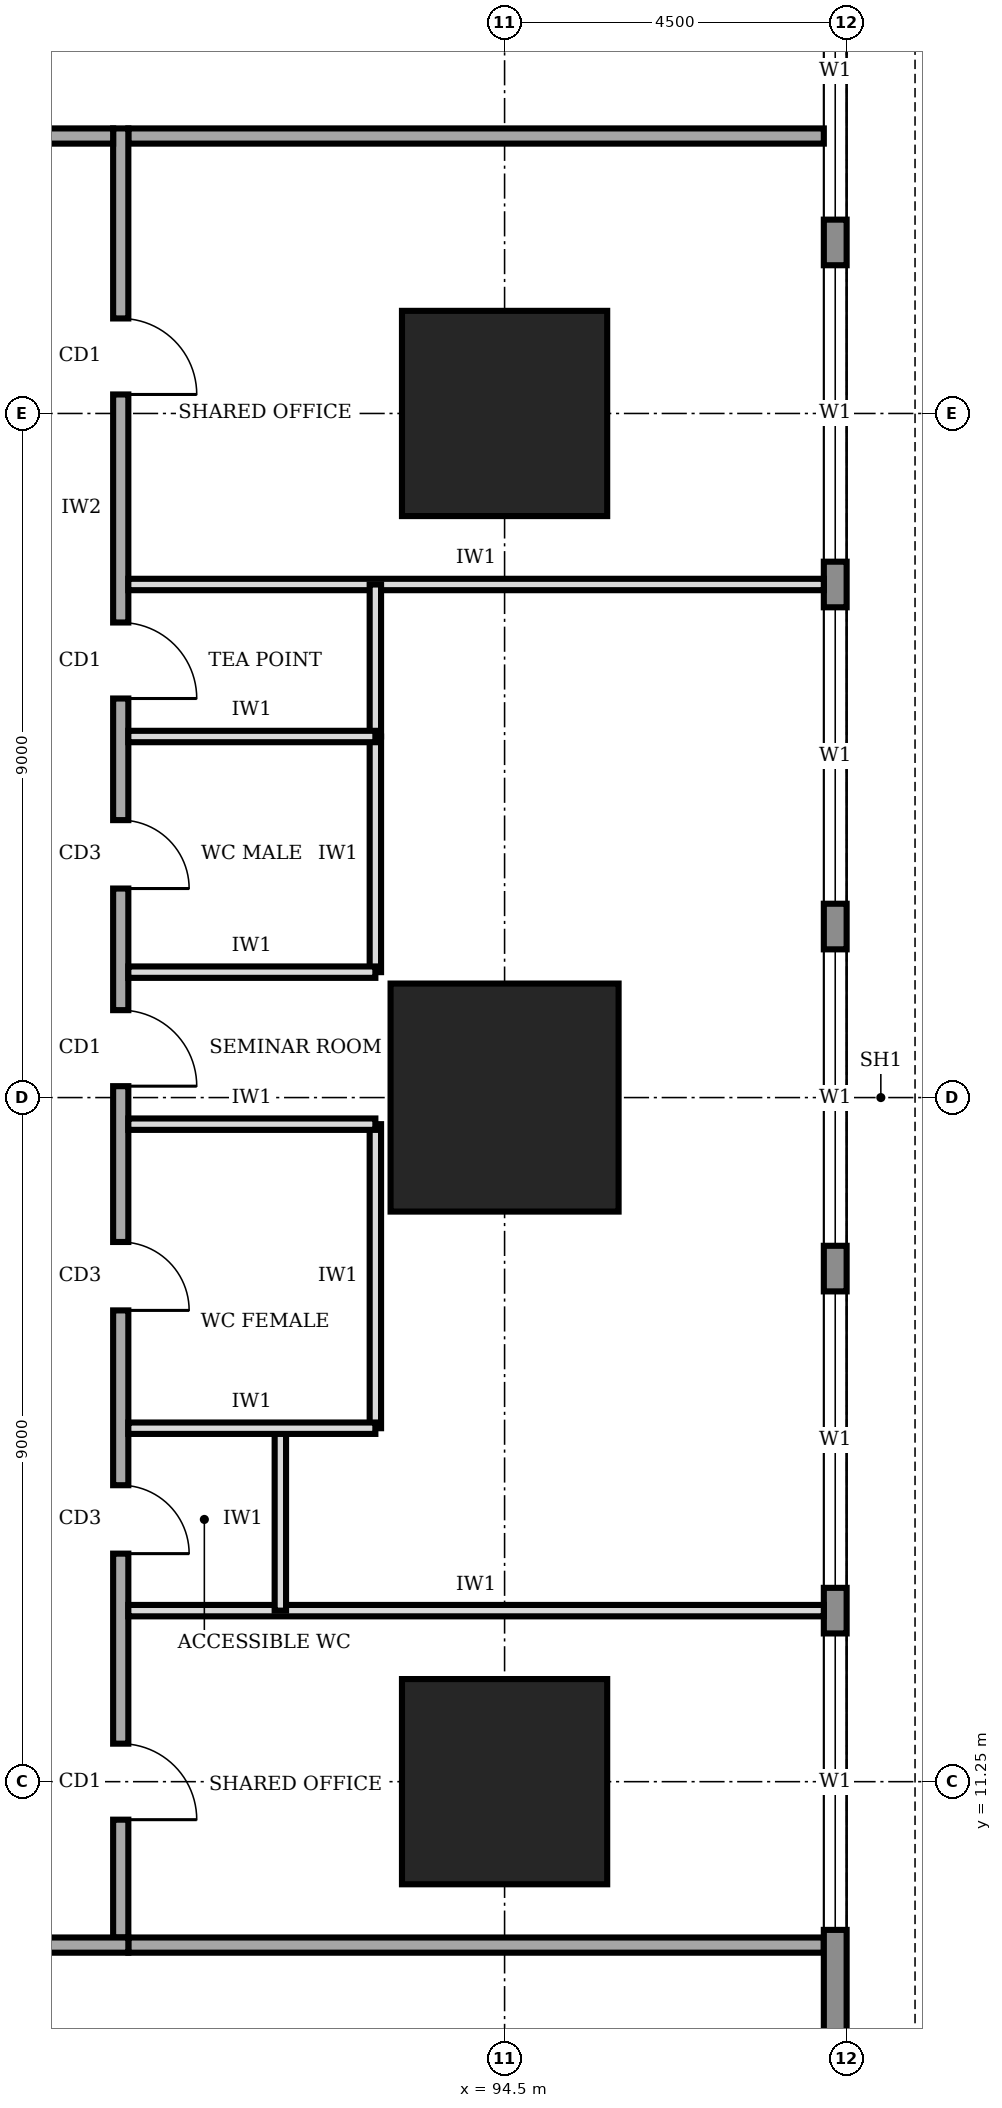
"""IFC4 building model, lengths in metres.
Left out: names, types, materials, properties, quantities, classifications, styles, units other than length and angle.
Written with IfcOpenShell. Run it as: python <this file> out.ifc"""

import sys

from ifc_helpers import new_model, si_unit, direction, frame, frame_2d, origin, origin_2d, place, context, subcontext, project, spatial, rectangle, extrude, element, fill, save


model = new_model("IFC4")
c1 = context("Model", 3, precision=1e-05, world=origin(), true_north=direction((0.0, 1.0)))
c2 = subcontext(c1, "Body", "Model", "MODEL_VIEW")
j1 = project(units=[si_unit("LENGTHUNIT", "METRE"), si_unit("PLANEANGLEUNIT", "RADIAN")], contexts=[c1])
p1 = place(None, origin())
s1 = spatial("IfcSite", under=j1, at=p1, CompositionType="ELEMENT")
p2 = place(p1, origin())
s2 = spatial("IfcBuilding", under=s1, at=p2, CompositionType="ELEMENT")
p3 = place(p2, frame((0.0, 0.0, 33.0)))
s3 = spatial("IfcBuildingStorey", under=s2, at=p3, CompositionType="ELEMENT", Elevation=33.0)
p4 = place(p3, frame((94.5, 11.25, 0.0), z_axis=(0.0, 0.0, 1.0), x_axis=(1.0, 0.0, 0.0)))
e1 = element("IfcColumn", 1, at=p4, inside=s3, PredefinedType="COLUMN", context=c2, shape_type="SweptSolid", body=[
    extrude(rectangle(XDim=2.7, YDim=2.7, at=origin_2d()), origin(), (0.0, 0.0, 1.0), 4.0),
])
p5 = place(p3, frame((94.5, 20.25, 0.0), z_axis=(0.0, 0.0, 1.0), x_axis=(1.0, 0.0, 0.0)))
e2 = element("IfcColumn", 2, at=p5, inside=s3, PredefinedType="COLUMN", context=c2, shape_type="SweptSolid", body=[
    extrude(rectangle(XDim=3.0, YDim=3.0, at=origin_2d()), origin(), (0.0, 0.0, 1.0), 4.0),
])
p6 = place(p3, frame((94.5, 29.25, 0.0), z_axis=(0.0, 0.0, 1.0), x_axis=(1.0, 0.0, 0.0)))
e3 = element("IfcColumn", 3, at=p6, inside=s3, PredefinedType="COLUMN", context=c2, shape_type="SweptSolid", body=[
    extrude(rectangle(XDim=2.7, YDim=2.7, at=origin_2d()), origin(), (0.0, 0.0, 1.0), 4.0),
])
p7 = place(p3, frame((98.85, 4.52, 0.0), z_axis=(0.0, 0.0, 1.0), x_axis=(0.0, 1.0, 0.0)))
e4 = element("IfcWall", 4, at=p7, inside=s3, PredefinedType="STANDARD", context=c2, shape_type="SweptSolid", body=[
    extrude(rectangle(XDim=31.46, YDim=0.3, at=frame_2d((15.73, 0.0))), origin(), (0.0, 0.0, 1.0), 3.75),
])
p8 = place(p7, frame((4.78, 0.0, 0.9)))
e5 = element("IfcOpeningElement", 5, at=p8, cuts=e4, PredefinedType="OPENING", context=c2, shape_type="SweptSolid", body=[
    extrude(rectangle(XDim=3.9, YDim=2.2, at=frame_2d((1.95, 1.1))), frame((0.0, 0.16, 0.0), z_axis=(0.0, -1.0, 0.0), x_axis=(1.0, 0.0, 0.0)), (0.0, 0.0, 1.0), 0.32),
])
p9 = place(p7, frame((9.28, 0.0, 0.9)))
e6 = element("IfcOpeningElement", 6, at=p9, cuts=e4, PredefinedType="OPENING", context=c2, shape_type="SweptSolid", body=[
    extrude(rectangle(XDim=3.9, YDim=2.2, at=frame_2d((1.95, 1.1))), frame((0.0, 0.16, 0.0), z_axis=(0.0, -1.0, 0.0), x_axis=(1.0, 0.0, 0.0)), (0.0, 0.0, 1.0), 0.32),
])
p10 = place(p7, frame((13.78, 0.0, 0.9)))
e7 = element("IfcOpeningElement", 7, at=p10, cuts=e4, PredefinedType="OPENING", context=c2, shape_type="SweptSolid", body=[
    extrude(rectangle(XDim=3.9, YDim=2.2, at=frame_2d((1.95, 1.1))), frame((0.0, 0.16, 0.0), z_axis=(0.0, -1.0, 0.0), x_axis=(1.0, 0.0, 0.0)), (0.0, 0.0, 1.0), 0.32),
])
p11 = place(p7, frame((18.28, 0.0, 0.9)))
e8 = element("IfcOpeningElement", 8, at=p11, cuts=e4, PredefinedType="OPENING", context=c2, shape_type="SweptSolid", body=[
    extrude(rectangle(XDim=3.9, YDim=2.2, at=frame_2d((1.95, 1.1))), frame((0.0, 0.16, 0.0), z_axis=(0.0, -1.0, 0.0), x_axis=(1.0, 0.0, 0.0)), (0.0, 0.0, 1.0), 0.32),
])
p12 = place(p7, frame((22.78, 0.0, 0.9)))
e9 = element("IfcOpeningElement", 9, at=p12, cuts=e4, PredefinedType="OPENING", context=c2, shape_type="SweptSolid", body=[
    extrude(rectangle(XDim=3.9, YDim=2.2, at=frame_2d((1.95, 1.1))), frame((0.0, 0.16, 0.0), z_axis=(0.0, -1.0, 0.0), x_axis=(1.0, 0.0, 0.0)), (0.0, 0.0, 1.0), 0.32),
])
p13 = place(p7, frame((27.28, 0.0, 0.9)))
e10 = element("IfcOpeningElement", 10, at=p13, cuts=e4, PredefinedType="OPENING", context=c2, shape_type="SweptSolid", body=[
    extrude(rectangle(XDim=3.9, YDim=2.2, at=frame_2d((1.95, 1.1))), frame((0.0, 0.16, 0.0), z_axis=(0.0, -1.0, 0.0), x_axis=(1.0, 0.0, 0.0)), (0.0, 0.0, 1.0), 0.32),
])
p14 = place(p3, frame((72.65, 9.1, 0.0), z_axis=(0.0, 0.0, 1.0), x_axis=(1.0, 0.0, 0.0)))
e11 = element("IfcWall", 11, at=p14, inside=s3, PredefinedType="SOLIDWALL", context=c2, shape_type="SweptSolid", body=[
    extrude(rectangle(XDim=16.9, YDim=0.2, at=frame_2d((8.45, 0.0))), origin(), (0.0, 0.0, 1.0), 3.75),
])
p15 = place(p14, frame((0.925, 0.0, 0.0)))
e12 = element("IfcOpeningElement", 12, at=p15, cuts=e11, PredefinedType="OPENING", context=c2, shape_type="SweptSolid", body=[
    extrude(rectangle(XDim=1.8, YDim=2.1, at=frame_2d((0.9, 1.05))), frame((0.0, 0.11, 0.0), z_axis=(0.0, -1.0, 0.0), x_axis=(1.0, 0.0, 0.0)), (0.0, 0.0, 1.0), 0.22),
])
p16 = place(p14, frame((7.85, 0.0, 0.0)))
e13 = element("IfcOpeningElement", 13, at=p16, cuts=e11, PredefinedType="OPENING", context=c2, shape_type="SweptSolid", body=[
    extrude(rectangle(XDim=1.0, YDim=2.1, at=frame_2d((0.5, 1.05))), frame((0.0, 0.11, 0.0), z_axis=(0.0, -1.0, 0.0), x_axis=(1.0, 0.0, 0.0)), (0.0, 0.0, 1.0), 0.22),
])
p17 = place(p14, frame((13.975, 0.0, 0.0)))
e14 = element("IfcOpeningElement", 14, at=p17, cuts=e11, PredefinedType="OPENING", context=c2, shape_type="SweptSolid", body=[
    extrude(rectangle(XDim=1.8, YDim=2.1, at=frame_2d((0.9, 1.05))), frame((0.0, 0.11, 0.0), z_axis=(0.0, -1.0, 0.0), x_axis=(1.0, 0.0, 0.0)), (0.0, 0.0, 1.0), 0.22),
])
p18 = place(p3, frame((89.45, 9.2, 0.0), z_axis=(0.0, 0.0, 1.0), x_axis=(0.0, 1.0, 0.0)))
e15 = element("IfcWall", 15, at=p18, inside=s3, PredefinedType="SOLIDWALL", context=c2, shape_type="SweptSolid", body=[
    extrude(rectangle(XDim=23.8, YDim=0.2, at=frame_2d((11.9, 0.0))), origin(), (0.0, 0.0, 1.0), 3.75),
])
p19 = place(p18, frame((1.55, 0.0, 0.0)))
e16 = element("IfcOpeningElement", 16, at=p19, cuts=e15, PredefinedType="OPENING", context=c2, shape_type="SweptSolid", body=[
    extrude(rectangle(XDim=1.0, YDim=2.1, at=frame_2d((0.5, 1.05))), frame((0.0, 0.11, 0.0), z_axis=(0.0, -1.0, 0.0), x_axis=(1.0, 0.0, 0.0)), (0.0, 0.0, 1.0), 0.22),
])
p20 = place(p18, frame((5.05, 0.0, 0.0)))
e17 = element("IfcOpeningElement", 17, at=p20, cuts=e15, PredefinedType="OPENING", context=c2, shape_type="SweptSolid", body=[
    extrude(rectangle(XDim=0.9, YDim=2.1, at=frame_2d((0.45, 1.05))), frame((0.0, 0.11, 0.0), z_axis=(0.0, -1.0, 0.0), x_axis=(1.0, 0.0, 0.0)), (0.0, 0.0, 1.0), 0.22),
])
p21 = place(p18, frame((8.25, 0.0, 0.0)))
e18 = element("IfcOpeningElement", 18, at=p21, cuts=e15, PredefinedType="OPENING", context=c2, shape_type="SweptSolid", body=[
    extrude(rectangle(XDim=0.9, YDim=2.1, at=frame_2d((0.45, 1.05))), frame((0.0, 0.11, 0.0), z_axis=(0.0, -1.0, 0.0), x_axis=(1.0, 0.0, 0.0)), (0.0, 0.0, 1.0), 0.22),
])
p22 = place(p18, frame((13.8, 0.0, 0.0)))
e19 = element("IfcOpeningElement", 19, at=p22, cuts=e15, PredefinedType="OPENING", context=c2, shape_type="SweptSolid", body=[
    extrude(rectangle(XDim=0.9, YDim=2.1, at=frame_2d((0.45, 1.05))), frame((0.0, 0.11, 0.0), z_axis=(0.0, -1.0, 0.0), x_axis=(1.0, 0.0, 0.0)), (0.0, 0.0, 1.0), 0.22),
])
p23 = place(p18, frame((16.3, 0.0, 0.0)))
e20 = element("IfcOpeningElement", 20, at=p23, cuts=e15, PredefinedType="OPENING", context=c2, shape_type="SweptSolid", body=[
    extrude(rectangle(XDim=1.0, YDim=2.1, at=frame_2d((0.5, 1.05))), frame((0.0, 0.11, 0.0), z_axis=(0.0, -1.0, 0.0), x_axis=(1.0, 0.0, 0.0)), (0.0, 0.0, 1.0), 0.22),
])
p24 = place(p18, frame((11.2, 0.0, 0.0)))
e21 = element("IfcOpeningElement", 21, at=p24, cuts=e15, PredefinedType="OPENING", context=c2, shape_type="SweptSolid", body=[
    extrude(rectangle(XDim=1.0, YDim=2.1, at=frame_2d((0.5, 1.05))), frame((0.0, 0.11, 0.0), z_axis=(0.0, -1.0, 0.0), x_axis=(1.0, 0.0, 0.0)), (0.0, 0.0, 1.0), 0.22),
])
p25 = place(p18, frame((20.3, 0.0, 0.0)))
e22 = element("IfcOpeningElement", 22, at=p25, cuts=e15, PredefinedType="OPENING", context=c2, shape_type="SweptSolid", body=[
    extrude(rectangle(XDim=1.0, YDim=2.1, at=frame_2d((0.5, 1.05))), frame((0.0, 0.11, 0.0), z_axis=(0.0, -1.0, 0.0), x_axis=(1.0, 0.0, 0.0)), (0.0, 0.0, 1.0), 0.22),
])
p26 = place(p3, frame((89.35, 32.9, 0.0), z_axis=(0.0, 0.0, 1.0), x_axis=(-1.0, 0.0, 0.0)))
e23 = element("IfcWall", 23, at=p26, inside=s3, PredefinedType="SOLIDWALL", context=c2, shape_type="SweptSolid", body=[
    extrude(rectangle(XDim=16.9, YDim=0.2, at=frame_2d((8.45, 0.0))), origin(), (0.0, 0.0, 1.0), 3.75),
])
p27 = place(p26, frame((14.375, 0.0, 0.0)))
e24 = element("IfcOpeningElement", 24, at=p27, cuts=e23, PredefinedType="OPENING", context=c2, shape_type="SweptSolid", body=[
    extrude(rectangle(XDim=1.0, YDim=2.1, at=frame_2d((0.5, 1.05))), frame((0.0, 0.11, 0.0), z_axis=(0.0, -1.0, 0.0), x_axis=(1.0, 0.0, 0.0)), (0.0, 0.0, 1.0), 0.22),
])
p28 = place(p26, frame((7.85, 0.0, 0.0)))
e25 = element("IfcOpeningElement", 25, at=p28, cuts=e23, PredefinedType="OPENING", context=c2, shape_type="SweptSolid", body=[
    extrude(rectangle(XDim=1.0, YDim=2.1, at=frame_2d((0.5, 1.05))), frame((0.0, 0.11, 0.0), z_axis=(0.0, -1.0, 0.0), x_axis=(1.0, 0.0, 0.0)), (0.0, 0.0, 1.0), 0.22),
])
p29 = place(p26, frame((1.325, 0.0, 0.0)))
e26 = element("IfcOpeningElement", 26, at=p29, cuts=e23, PredefinedType="OPENING", context=c2, shape_type="SweptSolid", body=[
    extrude(rectangle(XDim=1.0, YDim=2.1, at=frame_2d((0.5, 1.05))), frame((0.0, 0.11, 0.0), z_axis=(0.0, -1.0, 0.0), x_axis=(1.0, 0.0, 0.0)), (0.0, 0.0, 1.0), 0.22),
])
for number, where, z_axis, x_axis in (
    (27, (89.55, 9.1, 0.0), (0.0, 0.0, 1.0), (1.0, 0.0, 0.0)),
    (28, (89.55, 32.9, 0.0), (0.0, 0.0, 1.0), (1.0, 0.0, 0.0)),
):
    element("IfcWall", number, at=place(p3, frame(where, z_axis=z_axis, x_axis=x_axis)), inside=s3, PredefinedType="SOLIDWALL", context=c2, shape_type="SweptSolid", body=[
        extrude(rectangle(XDim=9.15, YDim=0.2, at=frame_2d((4.575, 0.0))), origin(), (0.0, 0.0, 1.0), 3.75),
    ])
for number, where, z_axis, x_axis in (
    (29, (89.55, 13.5, 0.0), (0.0, 0.0, 1.0), (1.0, 0.0, 0.0)),
    (30, (89.55, 27.0, 0.0), (0.0, 0.0, 1.0), (1.0, 0.0, 0.0)),
):
    element("IfcWall", number, at=place(p3, frame(where, z_axis=z_axis, x_axis=x_axis)), inside=s3, PredefinedType="PARTITIONING", context=c2, shape_type="SweptSolid", body=[
        extrude(rectangle(XDim=9.15, YDim=0.15, at=frame_2d((4.575, 0.0))), origin(), (0.0, 0.0, 1.0), 3.75),
    ])
p30 = place(p3, frame((89.55, 15.9, 0.0), z_axis=(0.0, 0.0, 1.0), x_axis=(1.0, 0.0, 0.0)))
e31 = element("IfcWall", 31, at=p30, inside=s3, PredefinedType="PARTITIONING", context=c2, shape_type="SweptSolid", body=[
    extrude(rectangle(XDim=3.25, YDim=0.15, at=frame_2d((1.625, 0.0))), origin(), (0.0, 0.0, 1.0), 3.75),
])
p31 = place(p3, frame((89.55, 19.9, 0.0), z_axis=(0.0, 0.0, 1.0), x_axis=(1.0, 0.0, 0.0)))
e32 = element("IfcWall", 32, at=p31, inside=s3, PredefinedType="PARTITIONING", context=c2, shape_type="SweptSolid", body=[
    extrude(rectangle(XDim=3.25, YDim=0.15, at=frame_2d((1.625, 0.0))), origin(), (0.0, 0.0, 1.0), 2.85),
])
for number, where, z_axis, x_axis in (
    (33, (89.55, 21.9, 0.0), (0.0, 0.0, 1.0), (1.0, 0.0, 0.0)),
    (34, (89.55, 25.0, 0.0), (0.0, 0.0, 1.0), (1.0, 0.0, 0.0)),
):
    element("IfcWall", number, at=place(p3, frame(where, z_axis=z_axis, x_axis=x_axis)), inside=s3, PredefinedType="PARTITIONING", context=c2, shape_type="SweptSolid", body=[
        extrude(rectangle(XDim=3.25, YDim=0.15, at=frame_2d((1.625, 0.0))), origin(), (0.0, 0.0, 1.0), 3.75),
    ])
p32 = place(p3, frame((91.55, 13.5, 0.0), z_axis=(0.0, 0.0, 1.0), x_axis=(0.0, 1.0, 0.0)))
e35 = element("IfcWall", 35, at=p32, inside=s3, PredefinedType="PARTITIONING", context=c2, shape_type="SweptSolid", body=[
    extrude(rectangle(XDim=2.4, YDim=0.15, at=frame_2d((1.2, 0.0))), origin(), (0.0, 0.0, 1.0), 3.75),
])
p33 = place(p3, frame((92.8, 15.9, 0.0), z_axis=(0.0, 0.0, 1.0), x_axis=(0.0, 1.0, 0.0)))
e36 = element("IfcWall", 36, at=p33, inside=s3, PredefinedType="PARTITIONING", context=c2, shape_type="SweptSolid", body=[
    extrude(rectangle(XDim=4.0, YDim=0.15, at=frame_2d((2.0, 0.0))), origin(), (0.0, 0.0, 1.0), 3.75),
])
p34 = place(p3, frame((92.8, 21.9, 0.0), z_axis=(0.0, 0.0, 1.0), x_axis=(0.0, 1.0, 0.0)))
e37 = element("IfcWall", 37, at=p34, inside=s3, PredefinedType="PARTITIONING", context=c2, shape_type="SweptSolid", body=[
    extrude(rectangle(XDim=3.1, YDim=0.15, at=frame_2d((1.55, 0.0))), origin(), (0.0, 0.0, 1.0), 3.75),
])
p35 = place(p3, frame((92.8, 25.0, 0.0), z_axis=(0.0, 0.0, 1.0), x_axis=(0.0, 1.0, 0.0)))
e38 = element("IfcWall", 38, at=p35, inside=s3, PredefinedType="PARTITIONING", context=c2, shape_type="SweptSolid", body=[
    extrude(rectangle(XDim=2.0, YDim=0.15, at=frame_2d((1.0, 0.0))), origin(), (0.0, 0.0, 1.0), 3.75),
])
p36 = place(p8, origin())
e39 = element("IfcWindow", 39, at=p36, inside=s3, PartitioningType="SINGLE_PANEL", PredefinedType="WINDOW", context=c2, shape_type="SweptSolid", body=[
    extrude(rectangle(XDim=3.9, YDim=2.2, at=frame_2d((1.95, 1.1))), frame((0.0, 0.03, 0.0), z_axis=(0.0, -1.0, 0.0), x_axis=(1.0, 0.0, 0.0)), (0.0, 0.0, 1.0), 0.06),
])
fill(e5, e39)
p37 = place(p9, origin())
e40 = element("IfcWindow", 40, at=p37, inside=s3, PartitioningType="SINGLE_PANEL", PredefinedType="WINDOW", context=c2, shape_type="SweptSolid", body=[
    extrude(rectangle(XDim=3.9, YDim=2.2, at=frame_2d((1.95, 1.1))), frame((0.0, 0.03, 0.0), z_axis=(0.0, -1.0, 0.0), x_axis=(1.0, 0.0, 0.0)), (0.0, 0.0, 1.0), 0.06),
])
fill(e6, e40)
p38 = place(p10, origin())
e41 = element("IfcWindow", 41, at=p38, inside=s3, PartitioningType="SINGLE_PANEL", PredefinedType="WINDOW", context=c2, shape_type="SweptSolid", body=[
    extrude(rectangle(XDim=3.9, YDim=2.2, at=frame_2d((1.95, 1.1))), frame((0.0, 0.03, 0.0), z_axis=(0.0, -1.0, 0.0), x_axis=(1.0, 0.0, 0.0)), (0.0, 0.0, 1.0), 0.06),
])
fill(e7, e41)
p39 = place(p11, origin())
e42 = element("IfcWindow", 42, at=p39, inside=s3, PartitioningType="SINGLE_PANEL", PredefinedType="WINDOW", context=c2, shape_type="SweptSolid", body=[
    extrude(rectangle(XDim=3.9, YDim=2.2, at=frame_2d((1.95, 1.1))), frame((0.0, 0.03, 0.0), z_axis=(0.0, -1.0, 0.0), x_axis=(1.0, 0.0, 0.0)), (0.0, 0.0, 1.0), 0.06),
])
fill(e8, e42)
p40 = place(p12, origin())
e43 = element("IfcWindow", 43, at=p40, inside=s3, PartitioningType="SINGLE_PANEL", PredefinedType="WINDOW", context=c2, shape_type="SweptSolid", body=[
    extrude(rectangle(XDim=3.9, YDim=2.2, at=frame_2d((1.95, 1.1))), frame((0.0, 0.03, 0.0), z_axis=(0.0, -1.0, 0.0), x_axis=(1.0, 0.0, 0.0)), (0.0, 0.0, 1.0), 0.06),
])
fill(e9, e43)
p41 = place(p13, origin())
e44 = element("IfcWindow", 44, at=p41, inside=s3, PartitioningType="SINGLE_PANEL", PredefinedType="WINDOW", context=c2, shape_type="SweptSolid", body=[
    extrude(rectangle(XDim=3.9, YDim=2.2, at=frame_2d((1.95, 1.1))), frame((0.0, 0.03, 0.0), z_axis=(0.0, -1.0, 0.0), x_axis=(1.0, 0.0, 0.0)), (0.0, 0.0, 1.0), 0.06),
])
fill(e10, e44)
p42 = place(p19, frame((1.0, 0.0, 0.0), z_axis=(0.0, 0.0, 1.0), x_axis=(-1.0, 0.0, 0.0)))
e45 = element("IfcDoor", 45, at=p42, inside=s3, OperationType="SINGLE_SWING_RIGHT", PredefinedType="DOOR", context=c2, shape_type="SweptSolid", body=[
    extrude(rectangle(XDim=1.0, YDim=2.1, at=frame_2d((0.5, 1.05))), frame((0.0, 0.025, 0.0), z_axis=(0.0, -1.0, 0.0), x_axis=(1.0, 0.0, 0.0)), (0.0, 0.0, 1.0), 0.05),
])
fill(e16, e45)
p43 = place(p20, frame((0.9, 0.0, 0.0), z_axis=(0.0, 0.0, 1.0), x_axis=(-1.0, 0.0, 0.0)))
e46 = element("IfcDoor", 46, at=p43, inside=s3, OperationType="SINGLE_SWING_RIGHT", PredefinedType="DOOR", context=c2, shape_type="SweptSolid", body=[
    extrude(rectangle(XDim=0.9, YDim=2.1, at=frame_2d((0.45, 1.05))), frame((0.0, 0.025, 0.0), z_axis=(0.0, -1.0, 0.0), x_axis=(1.0, 0.0, 0.0)), (0.0, 0.0, 1.0), 0.05),
])
fill(e17, e46)
p44 = place(p21, frame((0.9, 0.0, 0.0), z_axis=(0.0, 0.0, 1.0), x_axis=(-1.0, 0.0, 0.0)))
e47 = element("IfcDoor", 47, at=p44, inside=s3, OperationType="SINGLE_SWING_RIGHT", PredefinedType="DOOR", context=c2, shape_type="SweptSolid", body=[
    extrude(rectangle(XDim=0.9, YDim=2.1, at=frame_2d((0.45, 1.05))), frame((0.0, 0.025, 0.0), z_axis=(0.0, -1.0, 0.0), x_axis=(1.0, 0.0, 0.0)), (0.0, 0.0, 1.0), 0.05),
])
fill(e18, e47)
p45 = place(p22, frame((0.9, 0.0, 0.0), z_axis=(0.0, 0.0, 1.0), x_axis=(-1.0, 0.0, 0.0)))
e48 = element("IfcDoor", 48, at=p45, inside=s3, OperationType="SINGLE_SWING_RIGHT", PredefinedType="DOOR", context=c2, shape_type="SweptSolid", body=[
    extrude(rectangle(XDim=0.9, YDim=2.1, at=frame_2d((0.45, 1.05))), frame((0.0, 0.025, 0.0), z_axis=(0.0, -1.0, 0.0), x_axis=(1.0, 0.0, 0.0)), (0.0, 0.0, 1.0), 0.05),
])
fill(e19, e48)
p46 = place(p23, frame((1.0, 0.0, 0.0), z_axis=(0.0, 0.0, 1.0), x_axis=(-1.0, 0.0, 0.0)))
e49 = element("IfcDoor", 49, at=p46, inside=s3, OperationType="SINGLE_SWING_RIGHT", PredefinedType="DOOR", context=c2, shape_type="SweptSolid", body=[
    extrude(rectangle(XDim=1.0, YDim=2.1, at=frame_2d((0.5, 1.05))), frame((0.0, 0.025, 0.0), z_axis=(0.0, -1.0, 0.0), x_axis=(1.0, 0.0, 0.0)), (0.0, 0.0, 1.0), 0.05),
])
fill(e20, e49)
p47 = place(p24, frame((1.0, 0.0, 0.0), z_axis=(0.0, 0.0, 1.0), x_axis=(-1.0, 0.0, 0.0)))
e50 = element("IfcDoor", 50, at=p47, inside=s3, OperationType="SINGLE_SWING_RIGHT", PredefinedType="DOOR", context=c2, shape_type="SweptSolid", body=[
    extrude(rectangle(XDim=1.0, YDim=2.1, at=frame_2d((0.5, 1.05))), frame((0.0, 0.025, 0.0), z_axis=(0.0, -1.0, 0.0), x_axis=(1.0, 0.0, 0.0)), (0.0, 0.0, 1.0), 0.05),
])
fill(e21, e50)
p48 = place(p25, frame((1.0, 0.0, 0.0), z_axis=(0.0, 0.0, 1.0), x_axis=(-1.0, 0.0, 0.0)))
e51 = element("IfcDoor", 51, at=p48, inside=s3, OperationType="SINGLE_SWING_RIGHT", PredefinedType="DOOR", context=c2, shape_type="SweptSolid", body=[
    extrude(rectangle(XDim=1.0, YDim=2.1, at=frame_2d((0.5, 1.05))), frame((0.0, 0.025, 0.0), z_axis=(0.0, -1.0, 0.0), x_axis=(1.0, 0.0, 0.0)), (0.0, 0.0, 1.0), 0.05),
])
fill(e22, e51)
save(model, sys.argv[1])
